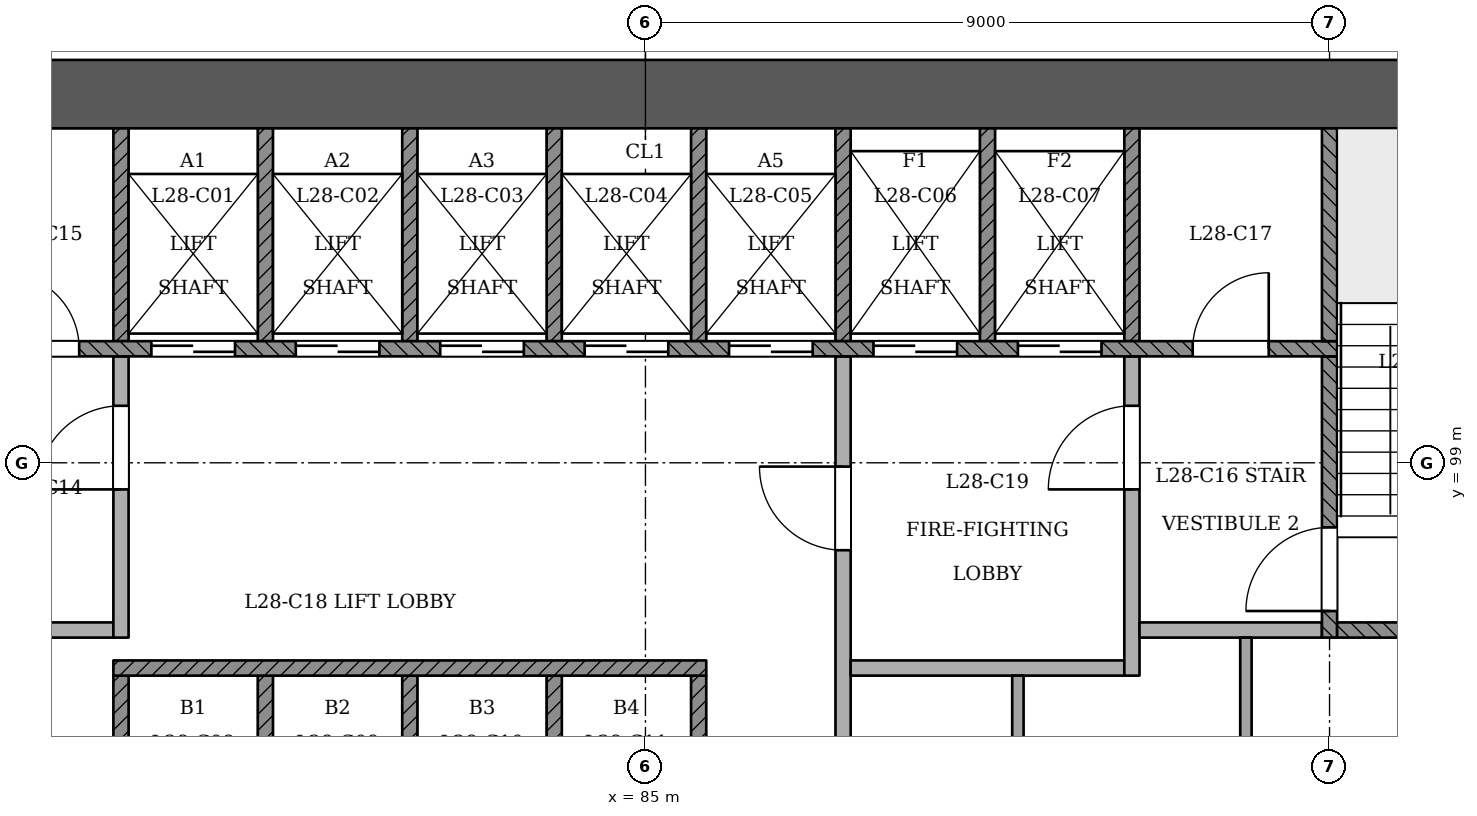
"""IFC4 building model, lengths in metres.
Left out: names, types, materials, properties, quantities, classifications, styles, units other than length and angle.
Written with IfcOpenShell. Run it as: python <this file> out.ifc"""

import sys

from ifc_helpers import new_model, si_unit, direction, frame, frame_2d, origin, place, context, subcontext, project, spatial, rectangle, extrude, element, fill, save


model = new_model("IFC4")
c1 = context("Model", 3, precision=1e-05, world=origin(), true_north=direction((0.0, 1.0)))
c2 = subcontext(c1, "Body", "Model", "MODEL_VIEW")
j1 = project(units=[si_unit("LENGTHUNIT", "METRE"), si_unit("PLANEANGLEUNIT", "RADIAN")], contexts=[c1])
p1 = place(None, origin())
s1 = spatial("IfcSite", under=j1, at=p1, CompositionType="ELEMENT")
p2 = place(p1, origin())
s2 = spatial("IfcBuilding", under=s1, at=p2, CompositionType="ELEMENT")
p3 = place(p2, frame((0.0, 0.0, 111.6)))
s3 = spatial("IfcBuildingStorey", under=s2, at=p3, CompositionType="ELEMENT", Elevation=111.6)
p4 = place(p3, frame((97.45, 103.85, 0.0), z_axis=(0.0, 0.0, 1.0), x_axis=(-1.0, 0.0, 0.0)))
e1 = element("IfcWall", 1, at=p4, inside=s3, PredefinedType="SHEAR", context=c2, shape_type="SweptSolid", body=[
    extrude(rectangle(XDim=25.35, YDim=0.9, at=frame_2d((12.675, 0.0))), origin(), (0.0, 0.0, 1.0), 3.6),
])
p5 = place(p3, frame((63.988, 97.906, 0.0), z_axis=(0.0, 0.0, 1.0), x_axis=(0.500001579174, -0.866024492046, 0.0)))
e2 = element("IfcWall", 2, at=p5, inside=s3, PredefinedType="PARTITIONING", context=c2, shape_type="SweptSolid", body=[
    extrude(rectangle(XDim=41.339, YDim=0.15, at=frame_2d((20.669, 0.0))), origin(), (0.0, 0.0, 1.0), 2.7),
])
p6 = place(p5, frame((0.228, 0.0, 0.0)))
e3 = element("IfcOpeningElement", 3, at=p6, cuts=e2, PredefinedType="OPENING", context=c2, shape_type="SweptSolid", body=[
    extrude(rectangle(XDim=1.2, YDim=2.1, at=frame_2d((0.6, 1.05))), frame((0.0, 0.085, 0.0), z_axis=(0.0, -1.0, 0.0), x_axis=(1.0, 0.0, 0.0)), (0.0, 0.0, 1.0), 0.171),
])
p7 = place(p5, frame((11.07, 0.0, 0.0)))
e4 = element("IfcOpeningElement", 4, at=p7, cuts=e2, PredefinedType="OPENING", context=c2, shape_type="SweptSolid", body=[
    extrude(rectangle(XDim=1.2, YDim=2.1, at=frame_2d((0.6, 1.05))), frame((0.0, 0.085, 0.0), z_axis=(0.0, -1.0, 0.0), x_axis=(1.0, 0.0, 0.0)), (0.0, 0.0, 1.0), 0.171),
])
p8 = place(p5, frame((22.32, 0.0, 0.0)))
e5 = element("IfcOpeningElement", 5, at=p8, cuts=e2, PredefinedType="OPENING", context=c2, shape_type="SweptSolid", body=[
    extrude(rectangle(XDim=1.2, YDim=2.1, at=frame_2d((0.6, 1.05))), frame((0.0, 0.085, 0.0), z_axis=(0.0, -1.0, 0.0), x_axis=(1.0, 0.0, 0.0)), (0.0, 0.0, 1.0), 0.171),
])
p9 = place(p5, frame((32.47, 0.0, 0.0)))
e6 = element("IfcOpeningElement", 6, at=p9, cuts=e2, PredefinedType="OPENING", context=c2, shape_type="SweptSolid", body=[
    extrude(rectangle(XDim=1.2, YDim=2.1, at=frame_2d((0.6, 1.05))), frame((0.0, 0.085, 0.0), z_axis=(0.0, -1.0, 0.0), x_axis=(1.0, 0.0, 0.0)), (0.0, 0.0, 1.0), 0.171),
])
p10 = place(p5, frame((39.758, 0.0, 0.0)))
e7 = element("IfcOpeningElement", 7, at=p10, cuts=e2, PredefinedType="OPENING", context=c2, shape_type="SweptSolid", body=[
    extrude(rectangle(XDim=1.0, YDim=2.1, at=frame_2d((0.5, 1.05))), frame((0.0, 0.085, 0.0), z_axis=(0.0, -1.0, 0.0), x_axis=(1.0, 0.0, 0.0)), (0.0, 0.0, 1.0), 0.171),
])
p11 = place(p3, frame((85.343, 62.105, 0.0), z_axis=(0.0, 0.0, 1.0), x_axis=(0.500001579174, 0.866024492046, 0.0)))
e8 = element("IfcWall", 8, at=p11, inside=s3, PredefinedType="PARTITIONING", context=c2, shape_type="SweptSolid", body=[
    extrude(rectangle(XDim=41.339, YDim=0.15, at=frame_2d((20.669, 0.0))), origin(), (0.0, 0.0, 1.0), 2.7),
])
p12 = place(p11, frame((0.312, 0.0, 0.0)))
e9 = element("IfcOpeningElement", 9, at=p12, cuts=e8, PredefinedType="OPENING", context=c2, shape_type="SweptSolid", body=[
    extrude(rectangle(XDim=1.2, YDim=2.1, at=frame_2d((0.6, 1.05))), frame((0.0, 0.085, 0.0), z_axis=(0.0, -1.0, 0.0), x_axis=(1.0, 0.0, 0.0)), (0.0, 0.0, 1.0), 0.171),
])
p13 = place(p11, frame((8.82, 0.0, 0.0)))
e10 = element("IfcOpeningElement", 10, at=p13, cuts=e8, PredefinedType="OPENING", context=c2, shape_type="SweptSolid", body=[
    extrude(rectangle(XDim=1.2, YDim=2.1, at=frame_2d((0.6, 1.05))), frame((0.0, 0.085, 0.0), z_axis=(0.0, -1.0, 0.0), x_axis=(1.0, 0.0, 0.0)), (0.0, 0.0, 1.0), 0.171),
])
p14 = place(p11, frame((22.32, 0.0, 0.0)))
e11 = element("IfcOpeningElement", 11, at=p14, cuts=e8, PredefinedType="OPENING", context=c2, shape_type="SweptSolid", body=[
    extrude(rectangle(XDim=1.2, YDim=2.1, at=frame_2d((0.6, 1.05))), frame((0.0, 0.085, 0.0), z_axis=(0.0, -1.0, 0.0), x_axis=(1.0, 0.0, 0.0)), (0.0, 0.0, 1.0), 0.171),
])
p15 = place(p11, frame((32.47, 0.0, 0.0)))
e12 = element("IfcOpeningElement", 12, at=p15, cuts=e8, PredefinedType="OPENING", context=c2, shape_type="SweptSolid", body=[
    extrude(rectangle(XDim=1.2, YDim=2.1, at=frame_2d((0.6, 1.05))), frame((0.0, 0.085, 0.0), z_axis=(0.0, -1.0, 0.0), x_axis=(1.0, 0.0, 0.0)), (0.0, 0.0, 1.0), 0.171),
])
p16 = place(p11, frame((39.739, 0.0, 0.0)))
e13 = element("IfcOpeningElement", 13, at=p16, cuts=e8, PredefinedType="OPENING", context=c2, shape_type="SweptSolid", body=[
    extrude(rectangle(XDim=1.0, YDim=2.1, at=frame_2d((0.5, 1.05))), frame((0.0, 0.085, 0.0), z_axis=(0.0, -1.0, 0.0), x_axis=(1.0, 0.0, 0.0)), (0.0, 0.0, 1.0), 0.171),
])
for number, where, z_axis, x_axis in (
    (14, (78.1, 93.4, 0.0), (0.0, 0.0, 1.0), (0.0, 1.0, 0.0)),
    (15, (80.0, 93.4, 0.0), (0.0, 0.0, 1.0), (0.0, 1.0, 0.0)),
    (16, (81.9, 93.4, 0.0), (0.0, 0.0, 1.0), (0.0, 1.0, 0.0)),
    (17, (83.8, 93.4, 0.0), (0.0, 0.0, 1.0), (0.0, 1.0, 0.0)),
    (18, (85.7, 93.4, 0.0), (0.0, 0.0, 1.0), (0.0, 1.0, 0.0)),
):
    element("IfcWall", number, at=place(p3, frame(where, z_axis=z_axis, x_axis=x_axis)), inside=s3, PredefinedType="SOLIDWALL", context=c2, shape_type="SweptSolid", body=[
        extrude(rectangle(XDim=2.8, YDim=0.2, at=frame_2d((1.4, 0.0))), origin(), (0.0, 0.0, 1.0), 3.1),
    ])
p17 = place(p3, frame((87.6, 93.4, 0.0), z_axis=(0.0, 0.0, 1.0), x_axis=(0.0, 1.0, 0.0)))
e19 = element("IfcWall", 19, at=p17, inside=s3, PredefinedType="PARTITIONING", context=c2, shape_type="SweptSolid", body=[
    extrude(rectangle(XDim=7.0, YDim=0.2, at=frame_2d((3.5, 0.0))), origin(), (0.0, 0.0, 1.0), 3.1),
])
p18 = place(p17, frame((4.45, 0.0, 0.0)))
e20 = element("IfcOpeningElement", 20, at=p18, cuts=e19, PredefinedType="OPENING", context=c2, shape_type="SweptSolid", body=[
    extrude(rectangle(XDim=1.1, YDim=2.1, at=frame_2d((0.55, 1.05))), frame((0.0, 0.11, 0.0), z_axis=(0.0, -1.0, 0.0), x_axis=(1.0, 0.0, 0.0)), (0.0, 0.0, 1.0), 0.221),
])
p19 = place(p3, frame((89.9, 93.4, 0.0), z_axis=(0.0, 0.0, 1.0), x_axis=(0.0, 1.0, 0.0)))
e21 = element("IfcWall", 21, at=p19, inside=s3, PredefinedType="PARTITIONING", context=c2, shape_type="SweptSolid", body=[
    extrude(rectangle(XDim=2.8, YDim=0.15, at=frame_2d((1.4, 0.0))), origin(), (0.0, 0.0, 1.0), 3.1),
])
p20 = place(p3, frame((92.9, 93.4, 0.0), z_axis=(0.0, 0.0, 1.0), x_axis=(0.0, 1.0, 0.0)))
e22 = element("IfcWall", 22, at=p20, inside=s3, PredefinedType="PARTITIONING", context=c2, shape_type="SweptSolid", body=[
    extrude(rectangle(XDim=3.3, YDim=0.15, at=frame_2d((1.65, 0.0))), origin(), (0.0, 0.0, 1.0), 3.1),
])
p21 = place(p3, frame((78.0, 96.3, 0.0), z_axis=(0.0, 0.0, 1.0), x_axis=(1.0, 0.0, 0.0)))
e23 = element("IfcWall", 23, at=p21, inside=s3, PredefinedType="SOLIDWALL", context=c2, shape_type="SweptSolid", body=[
    extrude(rectangle(XDim=7.8, YDim=0.2, at=frame_2d((3.9, 0.0))), origin(), (0.0, 0.0, 1.0), 3.1),
])
p22 = place(p3, frame((87.7, 96.3, 0.0), z_axis=(0.0, 0.0, 1.0), x_axis=(1.0, 0.0, 0.0)))
e24 = element("IfcWall", 24, at=p22, inside=s3, PredefinedType="PARTITIONING", context=c2, shape_type="SweptSolid", body=[
    extrude(rectangle(XDim=3.6, YDim=0.2, at=frame_2d((1.8, 0.0))), origin(), (0.0, 0.0, 1.0), 3.1),
])
p23 = place(p3, frame((91.4, 96.2, 0.0), z_axis=(0.0, 0.0, 1.0), x_axis=(0.0, 1.0, 0.0)))
e25 = element("IfcWall", 25, at=p23, inside=s3, PredefinedType="PARTITIONING", context=c2, shape_type="SweptSolid", body=[
    extrude(rectangle(XDim=4.2, YDim=0.2, at=frame_2d((2.1, 0.0))), origin(), (0.0, 0.0, 1.0), 3.1),
])
p24 = place(p23, frame((2.45, 0.0, 0.0)))
e26 = element("IfcOpeningElement", 26, at=p24, cuts=e25, PredefinedType="OPENING", context=c2, shape_type="SweptSolid", body=[
    extrude(rectangle(XDim=1.1, YDim=2.1, at=frame_2d((0.55, 1.05))), frame((0.0, 0.11, 0.0), z_axis=(0.0, -1.0, 0.0), x_axis=(1.0, 0.0, 0.0)), (0.0, 0.0, 1.0), 0.221),
])
p25 = place(p3, frame((76.1, 96.8, 0.0), z_axis=(0.0, 0.0, 1.0), x_axis=(1.0, 0.0, 0.0)))
e27 = element("IfcWall", 27, at=p25, inside=s3, PredefinedType="PARTITIONING", context=c2, shape_type="SweptSolid", body=[
    extrude(rectangle(XDim=1.9, YDim=0.2, at=frame_2d((0.95, 0.0))), origin(), (0.0, 0.0, 1.0), 3.1),
])
p26 = place(p3, frame((78.1, 96.7, 0.0), z_axis=(0.0, 0.0, 1.0), x_axis=(0.0, 1.0, 0.0)))
e28 = element("IfcWall", 28, at=p26, inside=s3, PredefinedType="PARTITIONING", context=c2, shape_type="SweptSolid", body=[
    extrude(rectangle(XDim=3.7, YDim=0.2, at=frame_2d((1.85, 0.0))), origin(), (0.0, 0.0, 1.0), 3.1),
])
p27 = place(p26, frame((1.95, 0.0, 0.0)))
e29 = element("IfcOpeningElement", 29, at=p27, cuts=e28, PredefinedType="OPENING", context=c2, shape_type="SweptSolid", body=[
    extrude(rectangle(XDim=1.1, YDim=2.1, at=frame_2d((0.55, 1.05))), frame((0.0, 0.11, 0.0), z_axis=(0.0, -1.0, 0.0), x_axis=(1.0, 0.0, 0.0)), (0.0, 0.0, 1.0), 0.221),
])
p28 = place(p3, frame((91.5, 96.8, 0.0), z_axis=(0.0, 0.0, 1.0), x_axis=(1.0, 0.0, 0.0)))
e30 = element("IfcWall", 30, at=p28, inside=s3, PredefinedType="PARTITIONING", context=c2, shape_type="SweptSolid", body=[
    extrude(rectangle(XDim=2.4, YDim=0.2, at=frame_2d((1.2, 0.0))), origin(), (0.0, 0.0, 1.0), 3.1),
])
p29 = place(p3, frame((94.0, 96.7, 0.0), z_axis=(0.0, 0.0, 1.0), x_axis=(0.0, 1.0, 0.0)))
e31 = element("IfcWall", 31, at=p29, inside=s3, PredefinedType="SOLIDWALL", context=c2, shape_type="SweptSolid", body=[
    extrude(rectangle(XDim=3.7, YDim=0.2, at=frame_2d((1.85, 0.0))), origin(), (0.0, 0.0, 1.0), 3.1),
])
p30 = place(p29, frame((0.35, 0.0, 0.0)))
e32 = element("IfcOpeningElement", 32, at=p30, cuts=e31, PredefinedType="OPENING", context=c2, shape_type="SweptSolid", body=[
    extrude(rectangle(XDim=1.1, YDim=2.1, at=frame_2d((0.55, 1.05))), frame((0.0, 0.11, 0.0), z_axis=(0.0, -1.0, 0.0), x_axis=(1.0, 0.0, 0.0)), (0.0, 0.0, 1.0), 0.221),
])
p31 = place(p3, frame((94.1, 96.8, 0.0), z_axis=(0.0, 0.0, 1.0), x_axis=(1.0, 0.0, 0.0)))
e33 = element("IfcWall", 33, at=p31, inside=s3, PredefinedType="SOLIDWALL", context=c2, shape_type="SweptSolid", body=[
    extrude(rectangle(XDim=2.9, YDim=0.2, at=frame_2d((1.45, 0.0))), origin(), (0.0, 0.0, 1.0), 3.1),
])
p32 = place(p3, frame((75.9, 100.5, 0.0), z_axis=(0.0, 0.0, 1.0), x_axis=(1.0, 0.0, 0.0)))
e34 = element("IfcWall", 34, at=p32, inside=s3, PredefinedType="SOLIDWALL", context=c2, shape_type="SweptSolid", body=[
    extrude(rectangle(XDim=18.2, YDim=0.2, at=frame_2d((9.1, 0.0))), origin(), (0.0, 0.0, 1.0), 3.1),
])
p33 = place(p32, frame((2.6, 0.0, 0.0)))
e35 = element("IfcOpeningElement", 35, at=p33, cuts=e34, PredefinedType="OPENING", context=c2, shape_type="SweptSolid", body=[
    extrude(rectangle(XDim=1.1, YDim=2.1, at=frame_2d((0.55, 1.05))), frame((0.0, 0.11, 0.0), z_axis=(0.0, -1.0, 0.0), x_axis=(1.0, 0.0, 0.0)), (0.0, 0.0, 1.0), 0.221),
])
p34 = place(p32, frame((4.5, 0.0, 0.0)))
e36 = element("IfcOpeningElement", 36, at=p34, cuts=e34, PredefinedType="OPENING", context=c2, shape_type="SweptSolid", body=[
    extrude(rectangle(XDim=1.1, YDim=2.1, at=frame_2d((0.55, 1.05))), frame((0.0, 0.11, 0.0), z_axis=(0.0, -1.0, 0.0), x_axis=(1.0, 0.0, 0.0)), (0.0, 0.0, 1.0), 0.221),
])
p35 = place(p32, frame((6.4, 0.0, 0.0)))
e37 = element("IfcOpeningElement", 37, at=p35, cuts=e34, PredefinedType="OPENING", context=c2, shape_type="SweptSolid", body=[
    extrude(rectangle(XDim=1.1, YDim=2.1, at=frame_2d((0.55, 1.05))), frame((0.0, 0.11, 0.0), z_axis=(0.0, -1.0, 0.0), x_axis=(1.0, 0.0, 0.0)), (0.0, 0.0, 1.0), 0.221),
])
p36 = place(p32, frame((8.3, 0.0, 0.0)))
e38 = element("IfcOpeningElement", 38, at=p36, cuts=e34, PredefinedType="OPENING", context=c2, shape_type="SweptSolid", body=[
    extrude(rectangle(XDim=1.1, YDim=2.1, at=frame_2d((0.55, 1.05))), frame((0.0, 0.11, 0.0), z_axis=(0.0, -1.0, 0.0), x_axis=(1.0, 0.0, 0.0)), (0.0, 0.0, 1.0), 0.221),
])
p37 = place(p32, frame((10.2, 0.0, 0.0)))
e39 = element("IfcOpeningElement", 39, at=p37, cuts=e34, PredefinedType="OPENING", context=c2, shape_type="SweptSolid", body=[
    extrude(rectangle(XDim=1.1, YDim=2.1, at=frame_2d((0.55, 1.05))), frame((0.0, 0.11, 0.0), z_axis=(0.0, -1.0, 0.0), x_axis=(1.0, 0.0, 0.0)), (0.0, 0.0, 1.0), 0.221),
])
p38 = place(p32, frame((12.1, 0.0, 0.0)))
e40 = element("IfcOpeningElement", 40, at=p38, cuts=e34, PredefinedType="OPENING", context=c2, shape_type="SweptSolid", body=[
    extrude(rectangle(XDim=1.1, YDim=2.1, at=frame_2d((0.55, 1.05))), frame((0.0, 0.11, 0.0), z_axis=(0.0, -1.0, 0.0), x_axis=(1.0, 0.0, 0.0)), (0.0, 0.0, 1.0), 0.221),
])
p39 = place(p32, frame((14.0, 0.0, 0.0)))
e41 = element("IfcOpeningElement", 41, at=p39, cuts=e34, PredefinedType="OPENING", context=c2, shape_type="SweptSolid", body=[
    extrude(rectangle(XDim=1.1, YDim=2.1, at=frame_2d((0.55, 1.05))), frame((0.0, 0.11, 0.0), z_axis=(0.0, -1.0, 0.0), x_axis=(1.0, 0.0, 0.0)), (0.0, 0.0, 1.0), 0.221),
])
p40 = place(p32, frame((0.65, 0.0, 0.0)))
e42 = element("IfcOpeningElement", 42, at=p40, cuts=e34, PredefinedType="OPENING", context=c2, shape_type="SweptSolid", body=[
    extrude(rectangle(XDim=1.0, YDim=2.1, at=frame_2d((0.5, 1.05))), frame((0.0, 0.11, 0.0), z_axis=(0.0, -1.0, 0.0), x_axis=(1.0, 0.0, 0.0)), (0.0, 0.0, 1.0), 0.221),
])
p41 = place(p32, frame((16.3, 0.0, 0.0)))
e43 = element("IfcOpeningElement", 43, at=p41, cuts=e34, PredefinedType="OPENING", context=c2, shape_type="SweptSolid", body=[
    extrude(rectangle(XDim=1.0, YDim=2.1, at=frame_2d((0.5, 1.05))), frame((0.0, 0.11, 0.0), z_axis=(0.0, -1.0, 0.0), x_axis=(1.0, 0.0, 0.0)), (0.0, 0.0, 1.0), 0.221),
])
for number, where, z_axis, x_axis in (
    (44, (78.1, 100.6, 0.0), (0.0, 0.0, 1.0), (0.0, 1.0, 0.0)),
    (45, (80.0, 100.6, 0.0), (0.0, 0.0, 1.0), (0.0, 1.0, 0.0)),
    (46, (81.9, 100.6, 0.0), (0.0, 0.0, 1.0), (0.0, 1.0, 0.0)),
    (47, (83.8, 100.6, 0.0), (0.0, 0.0, 1.0), (0.0, 1.0, 0.0)),
    (48, (85.7, 100.6, 0.0), (0.0, 0.0, 1.0), (0.0, 1.0, 0.0)),
    (49, (87.6, 100.6, 0.0), (0.0, 0.0, 1.0), (0.0, 1.0, 0.0)),
    (50, (89.5, 100.6, 0.0), (0.0, 0.0, 1.0), (0.0, 1.0, 0.0)),
    (51, (91.4, 100.6, 0.0), (0.0, 0.0, 1.0), (0.0, 1.0, 0.0)),
    (52, (94.0, 100.6, 0.0), (0.0, 0.0, 1.0), (0.0, 1.0, 0.0)),
):
    element("IfcWall", number, at=place(p3, frame(where, z_axis=z_axis, x_axis=x_axis)), inside=s3, PredefinedType="SOLIDWALL", context=c2, shape_type="SweptSolid", body=[
        extrude(rectangle(XDim=2.8, YDim=0.2, at=frame_2d((1.4, 0.0))), origin(), (0.0, 0.0, 1.0), 3.1),
    ])
p42 = place(p33, origin())
e53 = element("IfcDoor", 53, at=p42, inside=s3, OperationType="SLIDING_TO_RIGHT", PredefinedType="NOTDEFINED", context=c2, shape_type="SweptSolid", body=[
    extrude(rectangle(XDim=1.1, YDim=2.1, at=frame_2d((0.55, 1.05))), frame((0.0, 0.025, 0.0), z_axis=(0.0, -1.0, 0.0), x_axis=(1.0, 0.0, 0.0)), (0.0, 0.0, 1.0), 0.05),
])
fill(e35, e53)
p43 = place(p34, origin())
e54 = element("IfcDoor", 54, at=p43, inside=s3, OperationType="SLIDING_TO_LEFT", PredefinedType="NOTDEFINED", context=c2, shape_type="SweptSolid", body=[
    extrude(rectangle(XDim=1.1, YDim=2.1, at=frame_2d((0.55, 1.05))), frame((0.0, 0.025, 0.0), z_axis=(0.0, -1.0, 0.0), x_axis=(1.0, 0.0, 0.0)), (0.0, 0.0, 1.0), 0.05),
])
fill(e36, e54)
p44 = place(p35, origin())
e55 = element("IfcDoor", 55, at=p44, inside=s3, OperationType="SLIDING_TO_RIGHT", PredefinedType="NOTDEFINED", context=c2, shape_type="SweptSolid", body=[
    extrude(rectangle(XDim=1.1, YDim=2.1, at=frame_2d((0.55, 1.05))), frame((0.0, 0.025, 0.0), z_axis=(0.0, -1.0, 0.0), x_axis=(1.0, 0.0, 0.0)), (0.0, 0.0, 1.0), 0.05),
])
fill(e37, e55)
p45 = place(p36, origin())
e56 = element("IfcDoor", 56, at=p45, inside=s3, OperationType="SLIDING_TO_LEFT", PredefinedType="NOTDEFINED", context=c2, shape_type="SweptSolid", body=[
    extrude(rectangle(XDim=1.1, YDim=2.1, at=frame_2d((0.55, 1.05))), frame((0.0, 0.025, 0.0), z_axis=(0.0, -1.0, 0.0), x_axis=(1.0, 0.0, 0.0)), (0.0, 0.0, 1.0), 0.05),
])
fill(e38, e56)
p46 = place(p37, origin())
e57 = element("IfcDoor", 57, at=p46, inside=s3, OperationType="SLIDING_TO_RIGHT", PredefinedType="NOTDEFINED", context=c2, shape_type="SweptSolid", body=[
    extrude(rectangle(XDim=1.1, YDim=2.1, at=frame_2d((0.55, 1.05))), frame((0.0, 0.025, 0.0), z_axis=(0.0, -1.0, 0.0), x_axis=(1.0, 0.0, 0.0)), (0.0, 0.0, 1.0), 0.05),
])
fill(e39, e57)
p47 = place(p38, origin())
e58 = element("IfcDoor", 58, at=p47, inside=s3, OperationType="SLIDING_TO_RIGHT", PredefinedType="NOTDEFINED", context=c2, shape_type="SweptSolid", body=[
    extrude(rectangle(XDim=1.1, YDim=2.1, at=frame_2d((0.55, 1.05))), frame((0.0, 0.025, 0.0), z_axis=(0.0, -1.0, 0.0), x_axis=(1.0, 0.0, 0.0)), (0.0, 0.0, 1.0), 0.05),
])
fill(e40, e58)
p48 = place(p39, origin())
e59 = element("IfcDoor", 59, at=p48, inside=s3, OperationType="SLIDING_TO_LEFT", PredefinedType="NOTDEFINED", context=c2, shape_type="SweptSolid", body=[
    extrude(rectangle(XDim=1.1, YDim=2.1, at=frame_2d((0.55, 1.05))), frame((0.0, 0.025, 0.0), z_axis=(0.0, -1.0, 0.0), x_axis=(1.0, 0.0, 0.0)), (0.0, 0.0, 1.0), 0.05),
])
fill(e41, e59)
p49 = place(p30, origin())
e60 = element("IfcDoor", 60, at=p49, inside=s3, OperationType="SINGLE_SWING_LEFT", PredefinedType="NOTDEFINED", context=c2, shape_type="SweptSolid", body=[
    extrude(rectangle(XDim=1.1, YDim=2.1, at=frame_2d((0.55, 1.05))), frame((0.0, 0.025, 0.0), z_axis=(0.0, -1.0, 0.0), x_axis=(1.0, 0.0, 0.0)), (0.0, 0.0, 1.0), 0.05),
])
fill(e32, e60)
p50 = place(p27, origin())
e61 = element("IfcDoor", 61, at=p50, inside=s3, OperationType="SINGLE_SWING_LEFT", PredefinedType="NOTDEFINED", context=c2, shape_type="SweptSolid", body=[
    extrude(rectangle(XDim=1.1, YDim=2.1, at=frame_2d((0.55, 1.05))), frame((0.0, 0.025, 0.0), z_axis=(0.0, -1.0, 0.0), x_axis=(1.0, 0.0, 0.0)), (0.0, 0.0, 1.0), 0.05),
])
fill(e29, e61)
p51 = place(p18, origin())
e62 = element("IfcDoor", 62, at=p51, inside=s3, OperationType="SINGLE_SWING_RIGHT", PredefinedType="NOTDEFINED", context=c2, shape_type="SweptSolid", body=[
    extrude(rectangle(XDim=1.1, YDim=2.1, at=frame_2d((0.55, 1.05))), frame((0.0, 0.025, 0.0), z_axis=(0.0, -1.0, 0.0), x_axis=(1.0, 0.0, 0.0)), (0.0, 0.0, 1.0), 0.05),
])
fill(e20, e62)
p52 = place(p24, origin())
e63 = element("IfcDoor", 63, at=p52, inside=s3, OperationType="SINGLE_SWING_LEFT", PredefinedType="NOTDEFINED", context=c2, shape_type="SweptSolid", body=[
    extrude(rectangle(XDim=1.1, YDim=2.1, at=frame_2d((0.55, 1.05))), frame((0.0, 0.025, 0.0), z_axis=(0.0, -1.0, 0.0), x_axis=(1.0, 0.0, 0.0)), (0.0, 0.0, 1.0), 0.05),
])
fill(e26, e63)
p53 = place(p40, origin())
e64 = element("IfcDoor", 64, at=p53, inside=s3, OperationType="SINGLE_SWING_LEFT", PredefinedType="NOTDEFINED", context=c2, shape_type="SweptSolid", body=[
    extrude(rectangle(XDim=1.0, YDim=2.1, at=frame_2d((0.5, 1.05))), frame((0.0, 0.025, 0.0), z_axis=(0.0, -1.0, 0.0), x_axis=(1.0, 0.0, 0.0)), (0.0, 0.0, 1.0), 0.05),
])
fill(e42, e64)
p54 = place(p41, origin())
e65 = element("IfcDoor", 65, at=p54, inside=s3, OperationType="SINGLE_SWING_RIGHT", PredefinedType="NOTDEFINED", context=c2, shape_type="SweptSolid", body=[
    extrude(rectangle(XDim=1.0, YDim=2.1, at=frame_2d((0.5, 1.05))), frame((0.0, 0.025, 0.0), z_axis=(0.0, -1.0, 0.0), x_axis=(1.0, 0.0, 0.0)), (0.0, 0.0, 1.0), 0.05),
])
fill(e43, e65)
save(model, sys.argv[1])
